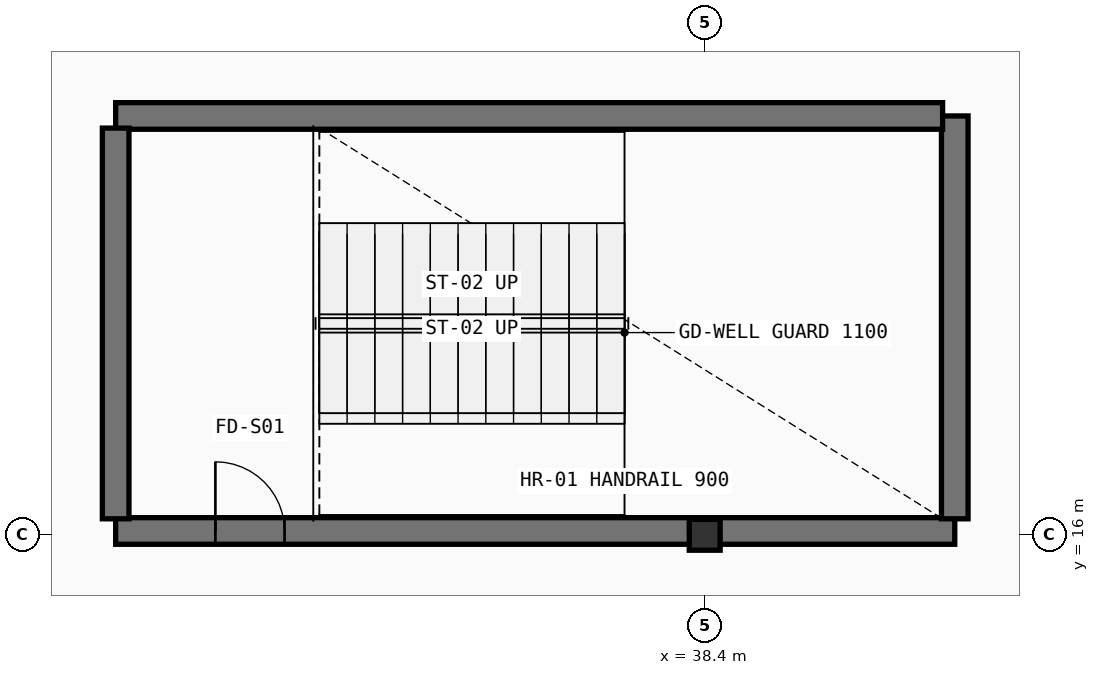
"""IFC4 building model, lengths in metres.
Left out: names, types, materials, properties, quantities, classifications, styles, units other than length and angle.
Written with IfcOpenShell. Run it as: python <this file> out.ifc"""

import sys

from ifc_helpers import new_model, si_unit, direction, frame, frame_2d, origin, origin_2d, place, context, subcontext, project, spatial, rectangle, hollow_circle, extrude, element, fill, save


model = new_model("IFC4")
c1 = context("Model", 3, precision=1e-05, world=origin(), true_north=direction((0.0, 1.0)))
c2 = subcontext(c1, "Body", "Model", "MODEL_VIEW")
j1 = project(units=[si_unit("LENGTHUNIT", "METRE"), si_unit("PLANEANGLEUNIT", "RADIAN")], contexts=[c1])
p1 = place(None, origin())
s1 = spatial("IfcSite", under=j1, at=p1, CompositionType="ELEMENT")
p2 = place(p1, origin())
s2 = spatial("IfcBuilding", under=s1, at=p2, CompositionType="ELEMENT")
p3 = place(p2, frame((0.0, 0.0, 15.9)))
s3 = spatial("IfcBuildingStorey", under=s2, at=p3, CompositionType="ELEMENT", Elevation=15.9)
p4 = place(p3, frame((38.4, 16.0, 0.0), z_axis=(0.0, 0.0, 1.0), x_axis=(1.0, 0.0, 0.0)))
e1 = element("IfcColumn", 1, at=p4, inside=s3, PredefinedType="COLUMN", context=c2, shape_type="SweptSolid", body=[
    extrude(hollow_circle(Radius=0.203, WallThickness=0.02, at=origin_2d()), origin(), (0.0, 0.0, 1.0), 4.5),
])
p5 = place(p3, frame((30.65, 16.05, 0.0), z_axis=(0.0, 0.0, 1.0), x_axis=(1.0, 0.0, 0.0)))
e2 = element("IfcWall", 2, at=p5, inside=s3, PredefinedType="SHEAR", context=c2, shape_type="SweptSolid", body=[
    extrude(rectangle(XDim=11.04, YDim=0.35, at=frame_2d((5.52, 0.0))), origin(), (0.0, 0.0, 1.0), 4.276),
])
p6 = place(p5, frame((1.312, 0.0, 0.0)))
e3 = element("IfcOpeningElement", 3, at=p6, cuts=e2, PredefinedType="OPENING", context=c2, shape_type="SweptSolid", body=[
    extrude(rectangle(XDim=0.91, YDim=2.08, at=frame_2d((0.455, 1.04))), frame((0.0, 0.185, 0.0), z_axis=(0.0, -1.0, 0.0), x_axis=(1.0, 0.0, 0.0)), (0.0, 0.0, 1.0), 0.37),
])
p7 = place(p3, frame((41.69, 16.21, 0.0), z_axis=(0.0, 0.0, 1.0), x_axis=(0.0, 1.0, 0.0)))
e4 = element("IfcWall", 4, at=p7, inside=s3, PredefinedType="SHEAR", context=c2, shape_type="SweptSolid", body=[
    extrude(rectangle(XDim=5.3, YDim=0.35, at=frame_2d((2.65, 0.0))), origin(), (0.0, 0.0, 1.0), 4.276),
])
p8 = place(p3, frame((41.53, 21.51, 0.0), z_axis=(0.0, 0.0, 1.0), x_axis=(-1.0, 0.0, 0.0)))
e5 = element("IfcWall", 5, at=p8, inside=s3, PredefinedType="SHEAR", context=c2, shape_type="SweptSolid", body=[
    extrude(rectangle(XDim=10.88, YDim=0.35, at=frame_2d((5.44, 0.0))), origin(), (0.0, 0.0, 1.0), 4.276),
])
p9 = place(p3, frame((30.65, 21.35, 0.0), z_axis=(0.0, 0.0, 1.0), x_axis=(0.0, -1.0, 0.0)))
e6 = element("IfcWall", 6, at=p9, inside=s3, PredefinedType="SHEAR", context=c2, shape_type="SweptSolid", body=[
    extrude(rectangle(XDim=5.14, YDim=0.35, at=frame_2d((2.57, 0.0))), origin(), (0.0, 0.0, 1.0), 4.276),
])
p10 = place(p6, origin())
e7 = element("IfcDoor", 7, at=p10, inside=s3, OperationType="SINGLE_SWING_RIGHT", PredefinedType="DOOR", context=c2, shape_type="SweptSolid", body=[
    extrude(rectangle(XDim=0.91, YDim=2.08, at=frame_2d((0.455, 1.04))), frame((0.0, 0.025, 0.0), z_axis=(0.0, -1.0, 0.0), x_axis=(1.0, 0.0, 0.0)), (0.0, 0.0, 1.0), 0.05),
])
fill(e3, e7)
save(model, sys.argv[1])
